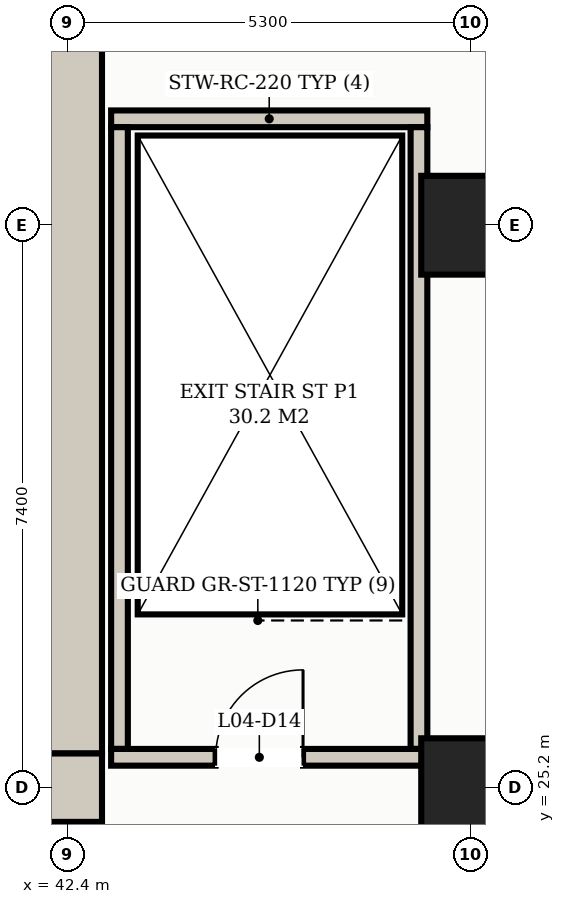
"""IFC4 building model, lengths in metres.
Left out: names, types, materials, properties, quantities, classifications, styles, units other than length and angle.
Written with IfcOpenShell. Run it as: python <this file> out.ifc"""

import sys

from ifc_helpers import new_model, si_unit, direction, frame, frame_2d, origin, origin_2d, place, context, subcontext, project, spatial, rectangle, hollow_rectangle, extrude, element, fill, save


model = new_model("IFC4")
c1 = context("Model", 3, precision=1e-05, world=origin(), true_north=direction((0.0, 1.0)))
c2 = subcontext(c1, "Body", "Model", "MODEL_VIEW")
j1 = project(units=[si_unit("LENGTHUNIT", "METRE"), si_unit("PLANEANGLEUNIT", "RADIAN")], contexts=[c1])
p1 = place(None, origin())
s1 = spatial("IfcSite", under=j1, at=p1, CompositionType="ELEMENT")
p2 = place(p1, origin())
s2 = spatial("IfcBuilding", under=s1, at=p2, CompositionType="ELEMENT")
p3 = place(p2, frame((0.0, 0.0, 19.0)))
s3 = spatial("IfcBuildingStorey", under=s2, at=p3, CompositionType="ELEMENT", Elevation=19.0)
p4 = place(p3, frame((42.4, 25.65, 0.0), z_axis=(0.0, 0.0, 1.0), x_axis=(0.0, 1.0, 0.0)))
e1 = element("IfcWall", 1, at=p4, inside=s3, PredefinedType="SHEAR", context=c2, shape_type="SweptSolid", body=[
    extrude(rectangle(XDim=13.9, YDim=0.9, at=frame_2d((6.95, 0.0))), origin(), (0.0, 0.0, 1.0), 4.86),
])
p5 = place(p3, frame((34.6, 25.2, 0.0), z_axis=(0.0, 0.0, 1.0), x_axis=(1.0, 0.0, 0.0)))
e2 = element("IfcWall", 2, at=p5, inside=s3, PredefinedType="SHEAR", context=c2, shape_type="SweptSolid", body=[
    extrude(rectangle(XDim=8.25, YDim=0.9, at=frame_2d((4.125, 0.0))), origin(), (0.0, 0.0, 1.0), 4.86),
])
p6 = place(p5, frame((0.65, 0.0, 0.0)))
e3 = element("IfcOpeningElement", 3, at=p6, cuts=e2, PredefinedType="OPENING", context=c2, shape_type="SweptSolid", body=[
    extrude(rectangle(XDim=1.25, YDim=2.2, at=frame_2d((0.625, 1.1))), frame((0.0, 0.46, 0.0), z_axis=(0.0, -1.0, 0.0), x_axis=(1.0, 0.0, 0.0)), (0.0, 0.0, 1.0), 0.92),
])
for number, where, z_axis, x_axis in (
    (4, (47.7, 25.2, 0.0), (0.0, 0.0, 1.0), (1.0, 0.0, 0.0)),
    (5, (47.7, 32.6, 0.0), (0.0, 0.0, 1.0), (1.0, 0.0, 0.0)),
):
    element("IfcColumn", number, at=place(p3, frame(where, z_axis=z_axis, x_axis=x_axis)), inside=s3, PredefinedType="COLUMN", context=c2, shape_type="SweptSolid", body=[
        extrude(hollow_rectangle(XDim=1.3, YDim=1.3, WallThickness=0.042, at=origin_2d()), origin(), (0.0, 0.0, 1.0), 5.2),
    ])
p7 = place(p3, frame((42.97, 34.0, 0.0), z_axis=(0.0, 0.0, 1.0), x_axis=(1.0, 0.0, 0.0)))
e6 = element("IfcWall", 6, at=p7, inside=s3, PredefinedType="SHEAR", context=c2, shape_type="SweptSolid", body=[
    extrude(rectangle(XDim=4.16, YDim=0.22, at=frame_2d((2.08, 0.0))), origin(), (0.0, 0.0, 1.0), 4.86),
])
for number, where, z_axis, x_axis in (
    (7, (43.08, 25.71, 0.0), (0.0, 0.0, 1.0), (0.0, 1.0, 0.0)),
    (8, (47.02, 25.71, 0.0), (0.0, 0.0, 1.0), (0.0, 1.0, 0.0)),
):
    element("IfcWall", number, at=place(p3, frame(where, z_axis=z_axis, x_axis=x_axis)), inside=s3, PredefinedType="SHEAR", context=c2, shape_type="SweptSolid", body=[
        extrude(rectangle(XDim=8.18, YDim=0.22, at=frame_2d((4.09, 0.0))), origin(), (0.0, 0.0, 1.0), 4.86),
    ])
p8 = place(p3, frame((42.97, 25.6, 0.0), z_axis=(0.0, 0.0, 1.0), x_axis=(1.0, 0.0, 0.0)))
e9 = element("IfcWall", 9, at=p8, inside=s3, PredefinedType="SHEAR", context=c2, shape_type="SweptSolid", body=[
    extrude(rectangle(XDim=4.16, YDim=0.22, at=frame_2d((2.08, 0.0))), origin(), (0.0, 0.0, 1.0), 4.86),
])
p9 = place(p8, frame((1.375, 0.0, 0.0)))
e10 = element("IfcOpeningElement", 10, at=p9, cuts=e9, PredefinedType="OPENING", context=c2, shape_type="SweptSolid", body=[
    extrude(rectangle(XDim=1.15, YDim=2.2, at=frame_2d((0.575, 1.1))), frame((0.0, 0.12, 0.0), z_axis=(0.0, -1.0, 0.0), x_axis=(1.0, 0.0, 0.0)), (0.0, 0.0, 1.0), 0.24),
])
p10 = place(p9, origin())
e11 = element("IfcDoor", 11, at=p10, inside=s3, OperationType="SINGLE_SWING_RIGHT", PredefinedType="DOOR", context=c2, shape_type="SweptSolid", body=[
    extrude(rectangle(XDim=1.15, YDim=2.2, at=frame_2d((0.575, 1.1))), frame((0.0, 0.025, 0.0), z_axis=(0.0, -1.0, 0.0), x_axis=(1.0, 0.0, 0.0)), (0.0, 0.0, 1.0), 0.05),
])
fill(e10, e11)
save(model, sys.argv[1])
